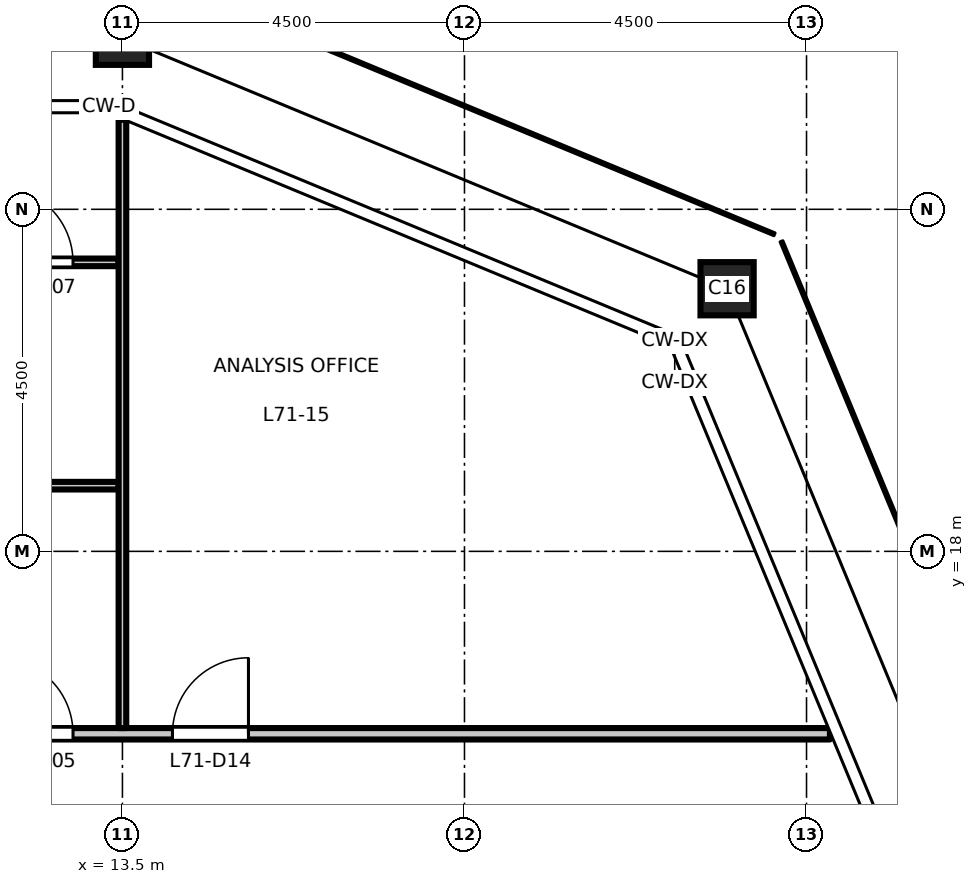
"""IFC4 building model, lengths in metres.
Left out: names, types, materials, properties, quantities, classifications, styles, units other than length and angle.
Written with IfcOpenShell. Run it as: python <this file> out.ifc"""

import sys

from ifc_helpers import new_model, si_unit, direction, frame, frame_2d, origin, origin_2d, place, context, subcontext, project, spatial, rectangle, hollow_rectangle, extrude, element, fill, save


model = new_model("IFC4")
c1 = context("Model", 3, precision=1e-05, world=origin(), true_north=direction((0.0, 1.0)))
c2 = subcontext(c1, "Body", "Model", "MODEL_VIEW")
j1 = project(units=[si_unit("LENGTHUNIT", "METRE"), si_unit("PLANEANGLEUNIT", "RADIAN")], contexts=[c1])
p1 = place(None, origin())
s1 = spatial("IfcSite", under=j1, at=p1, CompositionType="ELEMENT")
p2 = place(p1, origin())
s2 = spatial("IfcBuilding", under=s1, at=p2, CompositionType="ELEMENT")
p3 = place(p2, frame((0.0, 0.0, 330.2)))
s3 = spatial("IfcBuildingStorey", under=s2, at=p3, CompositionType="ELEMENT", Elevation=330.2)
for number, where, z_axis, x_axis in (
    (1, (21.455, 21.455, 0.0), (0.0, 0.0, 1.0), (1.0, 0.0, 0.0)),
    (2, (13.5, 24.75, 0.0), (0.0, 0.0, 1.0), (1.0, 0.0, 0.0)),
):
    element("IfcColumn", number, at=place(p3, frame(where, z_axis=z_axis, x_axis=x_axis)), inside=s3, PredefinedType="COLUMN", context=c2, shape_type="SweptSolid", body=[
        extrude(hollow_rectangle(XDim=0.7, YDim=0.7, WallThickness=0.036, at=origin_2d()), origin(), (0.0, 0.0, 1.0), 4.5),
    ])
p4 = place(p3, frame((-22.808, 15.6, 0.0), z_axis=(0.0, 0.0, 1.0), x_axis=(1.0, 0.0, 0.0)))
e3 = element("IfcWall", 3, at=p4, inside=s3, PredefinedType="PARTITIONING", context=c2, shape_type="SweptSolid", body=[
    extrude(rectangle(XDim=45.616, YDim=0.15, at=frame_2d((22.808, 0.0))), origin(), (0.0, 0.0, 1.0), 4.35),
])
p5 = place(p4, frame((16.658, 0.0, 0.0)))
e4 = element("IfcOpeningElement", 4, at=p5, cuts=e3, PredefinedType="OPENING", context=c2, shape_type="SweptSolid", body=[
    extrude(rectangle(XDim=1.0, YDim=2.1, at=frame_2d((0.5, 1.05))), frame((0.0, 0.085, 0.0), z_axis=(0.0, -1.0, 0.0), x_axis=(1.0, 0.0, 0.0)), (0.0, 0.0, 1.0), 0.17),
])
p6 = place(p4, frame((18.908, 0.0, 0.0)))
e5 = element("IfcOpeningElement", 5, at=p6, cuts=e3, PredefinedType="OPENING", context=c2, shape_type="SweptSolid", body=[
    extrude(rectangle(XDim=1.0, YDim=2.1, at=frame_2d((0.5, 1.05))), frame((0.0, 0.085, 0.0), z_axis=(0.0, -1.0, 0.0), x_axis=(1.0, 0.0, 0.0)), (0.0, 0.0, 1.0), 0.17),
])
p7 = place(p4, frame((34.658, 0.0, 0.0)))
e6 = element("IfcOpeningElement", 6, at=p7, cuts=e3, PredefinedType="OPENING", context=c2, shape_type="SweptSolid", body=[
    extrude(rectangle(XDim=1.0, YDim=2.1, at=frame_2d((0.5, 1.05))), frame((0.0, 0.085, 0.0), z_axis=(0.0, -1.0, 0.0), x_axis=(1.0, 0.0, 0.0)), (0.0, 0.0, 1.0), 0.17),
])
p8 = place(p4, frame((7.658, 0.0, 0.0)))
e7 = element("IfcOpeningElement", 7, at=p8, cuts=e3, PredefinedType="OPENING", context=c2, shape_type="SweptSolid", body=[
    extrude(rectangle(XDim=1.0, YDim=2.1, at=frame_2d((0.5, 1.05))), frame((0.0, 0.085, 0.0), z_axis=(0.0, -1.0, 0.0), x_axis=(1.0, 0.0, 0.0)), (0.0, 0.0, 1.0), 0.17),
])
p9 = place(p4, frame((36.966, 0.0, 0.0)))
e8 = element("IfcOpeningElement", 8, at=p9, cuts=e3, PredefinedType="OPENING", context=c2, shape_type="SweptSolid", body=[
    extrude(rectangle(XDim=1.0, YDim=2.1, at=frame_2d((0.5, 1.05))), frame((0.0, 0.085, 0.0), z_axis=(0.0, -1.0, 0.0), x_axis=(1.0, 0.0, 0.0)), (0.0, 0.0, 1.0), 0.17),
])
p10 = place(p3, frame((4.55, 18.864, 0.0), z_axis=(0.0, 0.0, 1.0), x_axis=(1.0, 0.0, 0.0)))
e9 = element("IfcWall", 9, at=p10, inside=s3, PredefinedType="PARTITIONING", context=c2, shape_type="SweptSolid", body=[
    extrude(rectangle(XDim=8.9, YDim=0.1, at=frame_2d((4.45, 0.0))), origin(), (0.0, 0.0, 1.0), 4.35),
])
p11 = place(p10, frame((0.55, 0.0, 0.0)))
e10 = element("IfcOpeningElement", 10, at=p11, cuts=e9, PredefinedType="OPENING", context=c2, shape_type="SweptSolid", body=[
    extrude(rectangle(XDim=1.0, YDim=2.1, at=frame_2d((0.5, 1.05))), frame((0.0, 0.06, 0.0), z_axis=(0.0, -1.0, 0.0), x_axis=(1.0, 0.0, 0.0)), (0.0, 0.0, 1.0), 0.12),
])
p12 = place(p3, frame((4.55, 21.802, 0.0), z_axis=(0.0, 0.0, 1.0), x_axis=(1.0, 0.0, 0.0)))
e11 = element("IfcWall", 11, at=p12, inside=s3, PredefinedType="PARTITIONING", context=c2, shape_type="SweptSolid", body=[
    extrude(rectangle(XDim=8.9, YDim=0.1, at=frame_2d((4.45, 0.0))), origin(), (0.0, 0.0, 1.0), 4.35),
])
p13 = place(p12, frame((7.3, 0.0, 0.0)))
e12 = element("IfcOpeningElement", 12, at=p13, cuts=e11, PredefinedType="OPENING", context=c2, shape_type="SweptSolid", body=[
    extrude(rectangle(XDim=1.0, YDim=2.1, at=frame_2d((0.5, 1.05))), frame((0.0, 0.06, 0.0), z_axis=(0.0, -1.0, 0.0), x_axis=(1.0, 0.0, 0.0)), (0.0, 0.0, 1.0), 0.12),
])
p14 = place(p3, frame((13.5, 15.675, 0.0), z_axis=(0.0, 0.0, 1.0), x_axis=(0.0, 1.0, 0.0)))
e13 = element("IfcWall", 13, at=p14, inside=s3, PredefinedType="PARTITIONING", context=c2, shape_type="SweptSolid", body=[
    extrude(rectangle(XDim=8.003, YDim=0.1, at=frame_2d((4.001, 0.0))), origin(), (0.0, 0.0, 1.0), 3.75),
])
p15 = place(p7, origin())
e14 = element("IfcDoor", 14, at=p15, inside=s3, OperationType="SINGLE_SWING_LEFT", PredefinedType="DOOR", context=c2, shape_type="SweptSolid", body=[
    extrude(rectangle(XDim=1.0, YDim=2.1, at=frame_2d((0.5, 1.05))), frame((0.0, 0.025, 0.0), z_axis=(0.0, -1.0, 0.0), x_axis=(1.0, 0.0, 0.0)), (0.0, 0.0, 1.0), 0.05),
])
fill(e6, e14)
p16 = place(p13, origin())
e15 = element("IfcDoor", 15, at=p16, inside=s3, OperationType="SINGLE_SWING_LEFT", PredefinedType="DOOR", context=c2, shape_type="SweptSolid", body=[
    extrude(rectangle(XDim=1.0, YDim=2.1, at=frame_2d((0.5, 1.05))), frame((0.0, 0.025, 0.0), z_axis=(0.0, -1.0, 0.0), x_axis=(1.0, 0.0, 0.0)), (0.0, 0.0, 1.0), 0.05),
])
fill(e12, e15)
p17 = place(p9, origin())
e16 = element("IfcDoor", 16, at=p17, inside=s3, OperationType="SINGLE_SWING_RIGHT", PredefinedType="DOOR", context=c2, shape_type="SweptSolid", body=[
    extrude(rectangle(XDim=1.0, YDim=2.1, at=frame_2d((0.5, 1.05))), frame((0.0, 0.025, 0.0), z_axis=(0.0, -1.0, 0.0), x_axis=(1.0, 0.0, 0.0)), (0.0, 0.0, 1.0), 0.05),
])
fill(e8, e16)
save(model, sys.argv[1])
